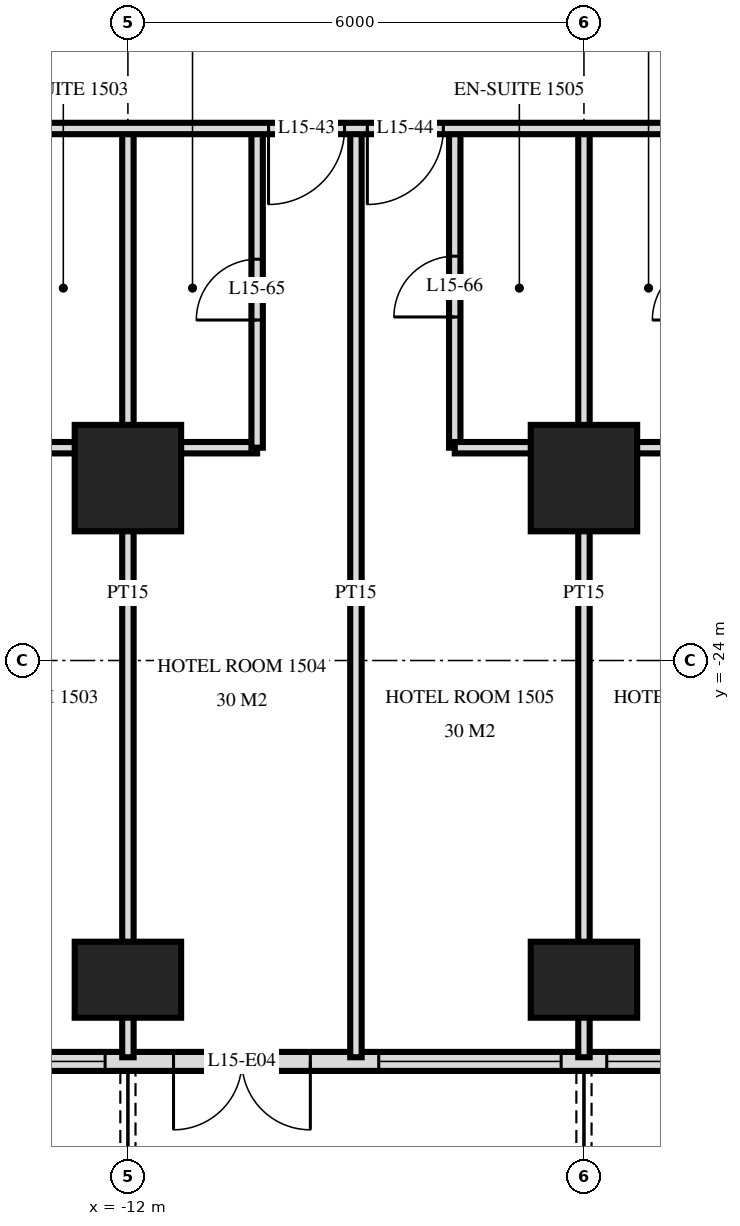
"""IFC4 building model, lengths in metres.
Left out: names, types, materials, properties, quantities, classifications, styles, units other than length and angle.
Written with IfcOpenShell. Run it as: python <this file> out.ifc"""

import sys

from ifc_helpers import new_model, si_unit, direction, frame, frame_2d, origin, origin_2d, place, context, subcontext, project, spatial, rectangle, extrude, element, fill, save


model = new_model("IFC4")
c1 = context("Model", 3, precision=1e-05, world=origin(), true_north=direction((0.0, 1.0)))
c2 = subcontext(c1, "Body", "Model", "MODEL_VIEW")
j1 = project(units=[si_unit("LENGTHUNIT", "METRE"), si_unit("PLANEANGLEUNIT", "RADIAN")], contexts=[c1])
p1 = place(None, origin())
s1 = spatial("IfcSite", under=j1, at=p1, CompositionType="ELEMENT")
p2 = place(p1, origin())
s2 = spatial("IfcBuilding", under=s1, at=p2, CompositionType="ELEMENT")
p3 = place(p2, frame((0.0, 0.0, 63.6)))
s3 = spatial("IfcBuildingStorey", under=s2, at=p3, CompositionType="ELEMENT", Elevation=63.6)
p4 = place(p3, frame((-12.0, -28.2, 0.0), z_axis=(0.0, 0.0, 1.0), x_axis=(1.0, 0.0, 0.0)))
e1 = element("IfcColumn", 1, at=p4, inside=s3, PredefinedType="COLUMN", context=c2, shape_type="SweptSolid", body=[
    extrude(rectangle(XDim=1.4, YDim=1.0, at=origin_2d()), origin(), (0.0, 0.0, 1.0), 3.6),
])
p5 = place(p3, frame((-12.0, -21.6, 0.0), z_axis=(0.0, 0.0, 1.0), x_axis=(1.0, 0.0, 0.0)))
e2 = element("IfcColumn", 2, at=p5, inside=s3, PredefinedType="COLUMN", context=c2, shape_type="SweptSolid", body=[
    extrude(rectangle(XDim=1.4, YDim=1.4, at=origin_2d()), origin(), (0.0, 0.0, 1.0), 3.6),
])
p6 = place(p3, frame((-6.0, -28.2, 0.0), z_axis=(0.0, 0.0, 1.0), x_axis=(1.0, 0.0, 0.0)))
e3 = element("IfcColumn", 3, at=p6, inside=s3, PredefinedType="COLUMN", context=c2, shape_type="SweptSolid", body=[
    extrude(rectangle(XDim=1.4, YDim=1.0, at=origin_2d()), origin(), (0.0, 0.0, 1.0), 3.6),
])
p7 = place(p3, frame((-6.0, -21.6, 0.0), z_axis=(0.0, 0.0, 1.0), x_axis=(1.0, 0.0, 0.0)))
e4 = element("IfcColumn", 4, at=p7, inside=s3, PredefinedType="COLUMN", context=c2, shape_type="SweptSolid", body=[
    extrude(rectangle(XDim=1.4, YDim=1.4, at=origin_2d()), origin(), (0.0, 0.0, 1.0), 3.6),
])
p8 = place(p3, frame((-28.775, -29.275, 0.0), z_axis=(0.0, 0.0, 1.0), x_axis=(1.0, 0.0, 0.0)))
e5 = element("IfcWall", 5, at=p8, inside=s3, PredefinedType="SOLIDWALL", context=c2, shape_type="SweptSolid", body=[
    extrude(rectangle(XDim=57.551, YDim=0.25, at=frame_2d((28.775, 0.0))), origin(), (0.0, 0.0, 1.0), 3.32),
])
p9 = place(p8, frame((0.575, 0.0, 0.0)))
e6 = element("IfcOpeningElement", 6, at=p9, cuts=e5, PredefinedType="OPENING", context=c2, shape_type="SweptSolid", body=[
    extrude(rectangle(XDim=1.8, YDim=2.4, at=frame_2d((0.9, 1.2))), frame((0.0, 0.135, 0.0), z_axis=(0.0, -1.0, 0.0), x_axis=(1.0, 0.0, 0.0)), (0.0, 0.0, 1.0), 0.27),
])
p10 = place(p8, frame((5.375, 0.0, 0.0)))
e7 = element("IfcOpeningElement", 7, at=p10, cuts=e5, PredefinedType="OPENING", context=c2, shape_type="SweptSolid", body=[
    extrude(rectangle(XDim=1.8, YDim=2.4, at=frame_2d((0.9, 1.2))), frame((0.0, 0.135, 0.0), z_axis=(0.0, -1.0, 0.0), x_axis=(1.0, 0.0, 0.0)), (0.0, 0.0, 1.0), 0.27),
])
p11 = place(p8, frame((8.075, 0.0, 0.3)))
e8 = element("IfcOpeningElement", 8, at=p11, cuts=e5, PredefinedType="OPENING", context=c2, shape_type="SweptSolid", body=[
    extrude(rectangle(XDim=2.4, YDim=2.1, at=frame_2d((1.2, 1.05))), frame((0.0, 0.135, 0.0), z_axis=(0.0, -1.0, 0.0), x_axis=(1.0, 0.0, 0.0)), (0.0, 0.0, 1.0), 0.27),
])
p12 = place(p8, frame((11.375, 0.0, 0.0)))
e9 = element("IfcOpeningElement", 9, at=p12, cuts=e5, PredefinedType="OPENING", context=c2, shape_type="SweptSolid", body=[
    extrude(rectangle(XDim=1.8, YDim=2.4, at=frame_2d((0.9, 1.2))), frame((0.0, 0.135, 0.0), z_axis=(0.0, -1.0, 0.0), x_axis=(1.0, 0.0, 0.0)), (0.0, 0.0, 1.0), 0.27),
])
p13 = place(p8, frame((14.075, 0.0, 0.3)))
e10 = element("IfcOpeningElement", 10, at=p13, cuts=e5, PredefinedType="OPENING", context=c2, shape_type="SweptSolid", body=[
    extrude(rectangle(XDim=2.4, YDim=2.1, at=frame_2d((1.2, 1.05))), frame((0.0, 0.135, 0.0), z_axis=(0.0, -1.0, 0.0), x_axis=(1.0, 0.0, 0.0)), (0.0, 0.0, 1.0), 0.27),
])
p14 = place(p8, frame((17.375, 0.0, 0.0)))
e11 = element("IfcOpeningElement", 11, at=p14, cuts=e5, PredefinedType="OPENING", context=c2, shape_type="SweptSolid", body=[
    extrude(rectangle(XDim=1.8, YDim=2.4, at=frame_2d((0.9, 1.2))), frame((0.0, 0.135, 0.0), z_axis=(0.0, -1.0, 0.0), x_axis=(1.0, 0.0, 0.0)), (0.0, 0.0, 1.0), 0.27),
])
p15 = place(p8, frame((20.075, 0.0, 0.3)))
e12 = element("IfcOpeningElement", 12, at=p15, cuts=e5, PredefinedType="OPENING", context=c2, shape_type="SweptSolid", body=[
    extrude(rectangle(XDim=2.4, YDim=2.1, at=frame_2d((1.2, 1.05))), frame((0.0, 0.135, 0.0), z_axis=(0.0, -1.0, 0.0), x_axis=(1.0, 0.0, 0.0)), (0.0, 0.0, 1.0), 0.27),
])
p16 = place(p8, frame((23.075, 0.0, 0.3)))
e13 = element("IfcOpeningElement", 13, at=p16, cuts=e5, PredefinedType="OPENING", context=c2, shape_type="SweptSolid", body=[
    extrude(rectangle(XDim=2.4, YDim=2.1, at=frame_2d((1.2, 1.05))), frame((0.0, 0.135, 0.0), z_axis=(0.0, -1.0, 0.0), x_axis=(1.0, 0.0, 0.0)), (0.0, 0.0, 1.0), 0.27),
])
p17 = place(p8, frame((26.375, 0.0, 0.0)))
e14 = element("IfcOpeningElement", 14, at=p17, cuts=e5, PredefinedType="OPENING", context=c2, shape_type="SweptSolid", body=[
    extrude(rectangle(XDim=1.8, YDim=2.4, at=frame_2d((0.9, 1.2))), frame((0.0, 0.135, 0.0), z_axis=(0.0, -1.0, 0.0), x_axis=(1.0, 0.0, 0.0)), (0.0, 0.0, 1.0), 0.27),
])
p18 = place(p8, frame((29.075, 0.0, 0.3)))
e15 = element("IfcOpeningElement", 15, at=p18, cuts=e5, PredefinedType="OPENING", context=c2, shape_type="SweptSolid", body=[
    extrude(rectangle(XDim=2.4, YDim=2.1, at=frame_2d((1.2, 1.05))), frame((0.0, 0.135, 0.0), z_axis=(0.0, -1.0, 0.0), x_axis=(1.0, 0.0, 0.0)), (0.0, 0.0, 1.0), 0.27),
])
p19 = place(p8, frame((32.375, 0.0, 0.0)))
e16 = element("IfcOpeningElement", 16, at=p19, cuts=e5, PredefinedType="OPENING", context=c2, shape_type="SweptSolid", body=[
    extrude(rectangle(XDim=1.8, YDim=2.4, at=frame_2d((0.9, 1.2))), frame((0.0, 0.135, 0.0), z_axis=(0.0, -1.0, 0.0), x_axis=(1.0, 0.0, 0.0)), (0.0, 0.0, 1.0), 0.27),
])
p20 = place(p8, frame((35.375, 0.0, 0.0)))
e17 = element("IfcOpeningElement", 17, at=p20, cuts=e5, PredefinedType="OPENING", context=c2, shape_type="SweptSolid", body=[
    extrude(rectangle(XDim=1.8, YDim=2.4, at=frame_2d((0.9, 1.2))), frame((0.0, 0.135, 0.0), z_axis=(0.0, -1.0, 0.0), x_axis=(1.0, 0.0, 0.0)), (0.0, 0.0, 1.0), 0.27),
])
p21 = place(p8, frame((38.075, 0.0, 0.3)))
e18 = element("IfcOpeningElement", 18, at=p21, cuts=e5, PredefinedType="OPENING", context=c2, shape_type="SweptSolid", body=[
    extrude(rectangle(XDim=2.4, YDim=2.1, at=frame_2d((1.2, 1.05))), frame((0.0, 0.135, 0.0), z_axis=(0.0, -1.0, 0.0), x_axis=(1.0, 0.0, 0.0)), (0.0, 0.0, 1.0), 0.27),
])
p22 = place(p8, frame((41.375, 0.0, 0.0)))
e19 = element("IfcOpeningElement", 19, at=p22, cuts=e5, PredefinedType="OPENING", context=c2, shape_type="SweptSolid", body=[
    extrude(rectangle(XDim=1.8, YDim=2.4, at=frame_2d((0.9, 1.2))), frame((0.0, 0.135, 0.0), z_axis=(0.0, -1.0, 0.0), x_axis=(1.0, 0.0, 0.0)), (0.0, 0.0, 1.0), 0.27),
])
p23 = place(p8, frame((44.075, 0.0, 0.3)))
e20 = element("IfcOpeningElement", 20, at=p23, cuts=e5, PredefinedType="OPENING", context=c2, shape_type="SweptSolid", body=[
    extrude(rectangle(XDim=2.4, YDim=2.1, at=frame_2d((1.2, 1.05))), frame((0.0, 0.135, 0.0), z_axis=(0.0, -1.0, 0.0), x_axis=(1.0, 0.0, 0.0)), (0.0, 0.0, 1.0), 0.27),
])
p24 = place(p8, frame((47.075, 0.0, 0.3)))
e21 = element("IfcOpeningElement", 21, at=p24, cuts=e5, PredefinedType="OPENING", context=c2, shape_type="SweptSolid", body=[
    extrude(rectangle(XDim=2.4, YDim=2.1, at=frame_2d((1.2, 1.05))), frame((0.0, 0.135, 0.0), z_axis=(0.0, -1.0, 0.0), x_axis=(1.0, 0.0, 0.0)), (0.0, 0.0, 1.0), 0.27),
])
p25 = place(p8, frame((50.375, 0.0, 0.0)))
e22 = element("IfcOpeningElement", 22, at=p25, cuts=e5, PredefinedType="OPENING", context=c2, shape_type="SweptSolid", body=[
    extrude(rectangle(XDim=1.8, YDim=2.4, at=frame_2d((0.9, 1.2))), frame((0.0, 0.135, 0.0), z_axis=(0.0, -1.0, 0.0), x_axis=(1.0, 0.0, 0.0)), (0.0, 0.0, 1.0), 0.27),
])
p26 = place(p8, frame((53.375, 0.0, 0.0)))
e23 = element("IfcOpeningElement", 23, at=p26, cuts=e5, PredefinedType="OPENING", context=c2, shape_type="SweptSolid", body=[
    extrude(rectangle(XDim=1.8, YDim=2.4, at=frame_2d((0.9, 1.2))), frame((0.0, 0.135, 0.0), z_axis=(0.0, -1.0, 0.0), x_axis=(1.0, 0.0, 0.0)), (0.0, 0.0, 1.0), 0.27),
])
p27 = place(p3, frame((-6.0, -29.22, 0.0), z_axis=(0.0, 0.0, 1.0), x_axis=(0.0, 1.0, 0.0)))
e24 = element("IfcWall", 24, at=p27, inside=s3, PredefinedType="PARTITIONING", context=c2, shape_type="SweptSolid", body=[
    extrude(rectangle(XDim=12.22, YDim=0.15, at=frame_2d((6.11, 0.0))), origin(), (0.0, 0.0, 1.0), 3.32),
])
p28 = place(p3, frame((-7.7, -21.2, 0.0), z_axis=(0.0, 0.0, 1.0), x_axis=(0.0, 1.0, 0.0)))
e25 = element("IfcWall", 25, at=p28, inside=s3, PredefinedType="PARTITIONING", context=c2, shape_type="SweptSolid", body=[
    extrude(rectangle(XDim=4.2, YDim=0.15, at=frame_2d((2.1, 0.0))), origin(), (0.0, 0.0, 1.0), 3.32),
])
p29 = place(p28, frame((1.72, 0.0, 0.0)))
e26 = element("IfcOpeningElement", 26, at=p29, cuts=e25, PredefinedType="OPENING", context=c2, shape_type="SweptSolid", body=[
    extrude(rectangle(XDim=0.8, YDim=2.1, at=frame_2d((0.4, 1.05))), frame((0.0, 0.085, 0.0), z_axis=(0.0, -1.0, 0.0), x_axis=(1.0, 0.0, 0.0)), (0.0, 0.0, 1.0), 0.17),
])
p30 = place(p3, frame((-9.0, -29.22, 0.0), z_axis=(0.0, 0.0, 1.0), x_axis=(0.0, 1.0, 0.0)))
e27 = element("IfcWall", 27, at=p30, inside=s3, PredefinedType="PARTITIONING", context=c2, shape_type="SweptSolid", body=[
    extrude(rectangle(XDim=12.22, YDim=0.15, at=frame_2d((6.11, 0.0))), origin(), (0.0, 0.0, 1.0), 3.32),
])
p31 = place(p3, frame((-10.3, -21.2, 0.0), z_axis=(0.0, 0.0, 1.0), x_axis=(0.0, 1.0, 0.0)))
e28 = element("IfcWall", 28, at=p31, inside=s3, PredefinedType="PARTITIONING", context=c2, shape_type="SweptSolid", body=[
    extrude(rectangle(XDim=4.2, YDim=0.15, at=frame_2d((2.1, 0.0))), origin(), (0.0, 0.0, 1.0), 3.32),
])
p32 = place(p31, frame((1.68, 0.0, 0.0)))
e29 = element("IfcOpeningElement", 29, at=p32, cuts=e28, PredefinedType="OPENING", context=c2, shape_type="SweptSolid", body=[
    extrude(rectangle(XDim=0.8, YDim=2.1, at=frame_2d((0.4, 1.05))), frame((0.0, 0.085, 0.0), z_axis=(0.0, -1.0, 0.0), x_axis=(1.0, 0.0, 0.0)), (0.0, 0.0, 1.0), 0.17),
])
p33 = place(p3, frame((-12.0, -29.22, 0.0), z_axis=(0.0, 0.0, 1.0), x_axis=(0.0, 1.0, 0.0)))
e30 = element("IfcWall", 30, at=p33, inside=s3, PredefinedType="PARTITIONING", context=c2, shape_type="SweptSolid", body=[
    extrude(rectangle(XDim=12.22, YDim=0.15, at=frame_2d((6.11, 0.0))), origin(), (0.0, 0.0, 1.0), 3.32),
])
for number, where, z_axis, x_axis in (
    (31, (-13.7, -21.2, 0.0), (0.0, 0.0, 1.0), (1.0, 0.0, 0.0)),
    (32, (-7.7, -21.2, 0.0), (0.0, 0.0, 1.0), (1.0, 0.0, 0.0)),
):
    element("IfcWall", number, at=place(p3, frame(where, z_axis=z_axis, x_axis=x_axis)), inside=s3, PredefinedType="PARTITIONING", context=c2, shape_type="SweptSolid", body=[
        extrude(rectangle(XDim=3.4, YDim=0.15, at=frame_2d((1.7, 0.0))), origin(), (0.0, 0.0, 1.0), 3.32),
    ])
p34 = place(p3, frame((-33.12, -17.0, 0.0), z_axis=(0.0, 0.0, 1.0), x_axis=(1.0, 0.0, 0.0)))
e33 = element("IfcWall", 33, at=p34, inside=s3, PredefinedType="PARTITIONING", context=c2, shape_type="SweptSolid", body=[
    extrude(rectangle(XDim=66.24, YDim=0.15, at=frame_2d((33.12, 0.0))), origin(), (0.0, 0.0, 1.0), 3.32),
])
p35 = place(p34, frame((12.27, 0.0, 0.0)))
e34 = element("IfcOpeningElement", 34, at=p35, cuts=e33, PredefinedType="OPENING", context=c2, shape_type="SweptSolid", body=[
    extrude(rectangle(XDim=1.0, YDim=2.1, at=frame_2d((0.5, 1.05))), frame((0.0, 0.085, 0.0), z_axis=(0.0, -1.0, 0.0), x_axis=(1.0, 0.0, 0.0)), (0.0, 0.0, 1.0), 0.17),
])
p36 = place(p34, frame((16.97, 0.0, 0.0)))
e35 = element("IfcOpeningElement", 35, at=p36, cuts=e33, PredefinedType="OPENING", context=c2, shape_type="SweptSolid", body=[
    extrude(rectangle(XDim=1.0, YDim=2.1, at=frame_2d((0.5, 1.05))), frame((0.0, 0.085, 0.0), z_axis=(0.0, -1.0, 0.0), x_axis=(1.0, 0.0, 0.0)), (0.0, 0.0, 1.0), 0.17),
])
p37 = place(p34, frame((18.27, 0.0, 0.0)))
e36 = element("IfcOpeningElement", 36, at=p37, cuts=e33, PredefinedType="OPENING", context=c2, shape_type="SweptSolid", body=[
    extrude(rectangle(XDim=1.0, YDim=2.1, at=frame_2d((0.5, 1.05))), frame((0.0, 0.085, 0.0), z_axis=(0.0, -1.0, 0.0), x_axis=(1.0, 0.0, 0.0)), (0.0, 0.0, 1.0), 0.17),
])
p38 = place(p34, frame((22.97, 0.0, 0.0)))
e37 = element("IfcOpeningElement", 37, at=p38, cuts=e33, PredefinedType="OPENING", context=c2, shape_type="SweptSolid", body=[
    extrude(rectangle(XDim=1.0, YDim=2.1, at=frame_2d((0.5, 1.05))), frame((0.0, 0.085, 0.0), z_axis=(0.0, -1.0, 0.0), x_axis=(1.0, 0.0, 0.0)), (0.0, 0.0, 1.0), 0.17),
])
p39 = place(p34, frame((24.27, 0.0, 0.0)))
e38 = element("IfcOpeningElement", 38, at=p39, cuts=e33, PredefinedType="OPENING", context=c2, shape_type="SweptSolid", body=[
    extrude(rectangle(XDim=1.0, YDim=2.1, at=frame_2d((0.5, 1.05))), frame((0.0, 0.085, 0.0), z_axis=(0.0, -1.0, 0.0), x_axis=(1.0, 0.0, 0.0)), (0.0, 0.0, 1.0), 0.17),
])
p40 = place(p34, frame((28.97, 0.0, 0.0)))
e39 = element("IfcOpeningElement", 39, at=p40, cuts=e33, PredefinedType="OPENING", context=c2, shape_type="SweptSolid", body=[
    extrude(rectangle(XDim=1.0, YDim=2.1, at=frame_2d((0.5, 1.05))), frame((0.0, 0.085, 0.0), z_axis=(0.0, -1.0, 0.0), x_axis=(1.0, 0.0, 0.0)), (0.0, 0.0, 1.0), 0.17),
])
p41 = place(p34, frame((30.27, 0.0, 0.0)))
e40 = element("IfcOpeningElement", 40, at=p41, cuts=e33, PredefinedType="OPENING", context=c2, shape_type="SweptSolid", body=[
    extrude(rectangle(XDim=1.0, YDim=2.1, at=frame_2d((0.5, 1.05))), frame((0.0, 0.085, 0.0), z_axis=(0.0, -1.0, 0.0), x_axis=(1.0, 0.0, 0.0)), (0.0, 0.0, 1.0), 0.17),
])
p42 = place(p34, frame((33.82, 0.0, 0.0)))
e41 = element("IfcOpeningElement", 41, at=p42, cuts=e33, PredefinedType="OPENING", context=c2, shape_type="SweptSolid", body=[
    extrude(rectangle(XDim=1.0, YDim=2.1, at=frame_2d((0.5, 1.05))), frame((0.0, 0.085, 0.0), z_axis=(0.0, -1.0, 0.0), x_axis=(1.0, 0.0, 0.0)), (0.0, 0.0, 1.0), 0.17),
])
p43 = place(p34, frame((46.27, 0.0, 0.0)))
e42 = element("IfcOpeningElement", 42, at=p43, cuts=e33, PredefinedType="OPENING", context=c2, shape_type="SweptSolid", body=[
    extrude(rectangle(XDim=1.0, YDim=2.1, at=frame_2d((0.5, 1.05))), frame((0.0, 0.085, 0.0), z_axis=(0.0, -1.0, 0.0), x_axis=(1.0, 0.0, 0.0)), (0.0, 0.0, 1.0), 0.17),
])
p44 = place(p34, frame((52.97, 0.0, 0.0)))
e43 = element("IfcOpeningElement", 43, at=p44, cuts=e33, PredefinedType="OPENING", context=c2, shape_type="SweptSolid", body=[
    extrude(rectangle(XDim=1.0, YDim=2.1, at=frame_2d((0.5, 1.05))), frame((0.0, 0.085, 0.0), z_axis=(0.0, -1.0, 0.0), x_axis=(1.0, 0.0, 0.0)), (0.0, 0.0, 1.0), 0.17),
])
p45 = place(p34, frame((6.05, 0.0, 0.0)))
e44 = element("IfcOpeningElement", 44, at=p45, cuts=e33, PredefinedType="OPENING", context=c2, shape_type="SweptSolid", body=[
    extrude(rectangle(XDim=1.0, YDim=2.1, at=frame_2d((0.5, 1.05))), frame((0.0, 0.085, 0.0), z_axis=(0.0, -1.0, 0.0), x_axis=(1.0, 0.0, 0.0)), (0.0, 0.0, 1.0), 0.17),
])
p46 = place(p34, frame((59.15, 0.0, 0.0)))
e45 = element("IfcOpeningElement", 45, at=p46, cuts=e33, PredefinedType="OPENING", context=c2, shape_type="SweptSolid", body=[
    extrude(rectangle(XDim=1.0, YDim=2.1, at=frame_2d((0.5, 1.05))), frame((0.0, 0.085, 0.0), z_axis=(0.0, -1.0, 0.0), x_axis=(1.0, 0.0, 0.0)), (0.0, 0.0, 1.0), 0.17),
])
p47 = place(p13, origin())
e46 = element("IfcWindow", 46, at=p47, inside=s3, PartitioningType="SINGLE_PANEL", PredefinedType="WINDOW", context=c2, shape_type="SweptSolid", body=[
    extrude(rectangle(XDim=2.4, YDim=2.1, at=frame_2d((1.2, 1.05))), frame((0.0, 0.03, 0.0), z_axis=(0.0, -1.0, 0.0), x_axis=(1.0, 0.0, 0.0)), (0.0, 0.0, 1.0), 0.06),
])
fill(e10, e46)
p48 = place(p14, frame((0.9, 0.0, 0.0), z_axis=(0.0, 0.0, 1.0), x_axis=(-1.0, 0.0, 0.0)))
e47 = element("IfcDoor", 47, at=p48, inside=s3, OperationType="DOUBLE_DOOR_SINGLE_SWING", PredefinedType="DOOR", context=c2, shape_type="SweptSolid", body=[
    extrude(rectangle(XDim=1.8, YDim=2.4, at=frame_2d((0.0, 1.2))), frame((0.0, -0.025, 0.0), z_axis=(0.0, 1.0, 0.0), x_axis=(-1.0, 0.0, 0.0)), (0.0, 0.0, 1.0), 0.05),
])
fill(e11, e47)
p49 = place(p15, origin())
e48 = element("IfcWindow", 48, at=p49, inside=s3, PartitioningType="SINGLE_PANEL", PredefinedType="WINDOW", context=c2, shape_type="SweptSolid", body=[
    extrude(rectangle(XDim=2.4, YDim=2.1, at=frame_2d((1.2, 1.05))), frame((0.0, 0.03, 0.0), z_axis=(0.0, -1.0, 0.0), x_axis=(1.0, 0.0, 0.0)), (0.0, 0.0, 1.0), 0.06),
])
fill(e12, e48)
p50 = place(p16, origin())
e49 = element("IfcWindow", 49, at=p50, inside=s3, PartitioningType="SINGLE_PANEL", PredefinedType="WINDOW", context=c2, shape_type="SweptSolid", body=[
    extrude(rectangle(XDim=2.4, YDim=2.1, at=frame_2d((1.2, 1.05))), frame((0.0, 0.03, 0.0), z_axis=(0.0, -1.0, 0.0), x_axis=(1.0, 0.0, 0.0)), (0.0, 0.0, 1.0), 0.06),
])
fill(e13, e49)
p51 = place(p38, frame((0.5, 0.0, 0.0), z_axis=(0.0, 0.0, 1.0), x_axis=(-1.0, 0.0, 0.0)))
e50 = element("IfcDoor", 50, at=p51, inside=s3, OperationType="SINGLE_SWING_LEFT", PredefinedType="DOOR", context=c2, shape_type="SweptSolid", body=[
    extrude(rectangle(XDim=1.0, YDim=2.1, at=frame_2d((0.0, 1.05))), frame((0.0, -0.025, 0.0), z_axis=(0.0, 1.0, 0.0), x_axis=(-1.0, 0.0, 0.0)), (0.0, 0.0, 1.0), 0.05),
])
fill(e37, e50)
p52 = place(p39, frame((0.5, 0.0, 0.0), z_axis=(0.0, 0.0, 1.0), x_axis=(-1.0, 0.0, 0.0)))
e51 = element("IfcDoor", 51, at=p52, inside=s3, OperationType="SINGLE_SWING_LEFT", PredefinedType="DOOR", context=c2, shape_type="SweptSolid", body=[
    extrude(rectangle(XDim=1.0, YDim=2.1, at=frame_2d((0.0, 1.05))), frame((0.0, -0.025, 0.0), z_axis=(0.0, 1.0, 0.0), x_axis=(-1.0, 0.0, 0.0)), (0.0, 0.0, 1.0), 0.05),
])
fill(e38, e51)
p53 = place(p32, origin())
e52 = element("IfcDoor", 52, at=p53, inside=s3, OperationType="SINGLE_SWING_RIGHT", PredefinedType="DOOR", context=c2, shape_type="SweptSolid", body=[
    extrude(rectangle(XDim=0.8, YDim=2.1, at=frame_2d((0.4, 1.05))), frame((0.0, 0.025, 0.0), z_axis=(0.0, -1.0, 0.0), x_axis=(1.0, 0.0, 0.0)), (0.0, 0.0, 1.0), 0.05),
])
fill(e29, e52)
p54 = place(p29, origin())
e53 = element("IfcDoor", 53, at=p54, inside=s3, OperationType="SINGLE_SWING_RIGHT", PredefinedType="DOOR", context=c2, shape_type="SweptSolid", body=[
    extrude(rectangle(XDim=0.8, YDim=2.1, at=frame_2d((0.4, 1.05))), frame((0.0, 0.025, 0.0), z_axis=(0.0, -1.0, 0.0), x_axis=(1.0, 0.0, 0.0)), (0.0, 0.0, 1.0), 0.05),
])
fill(e26, e53)
save(model, sys.argv[1])
